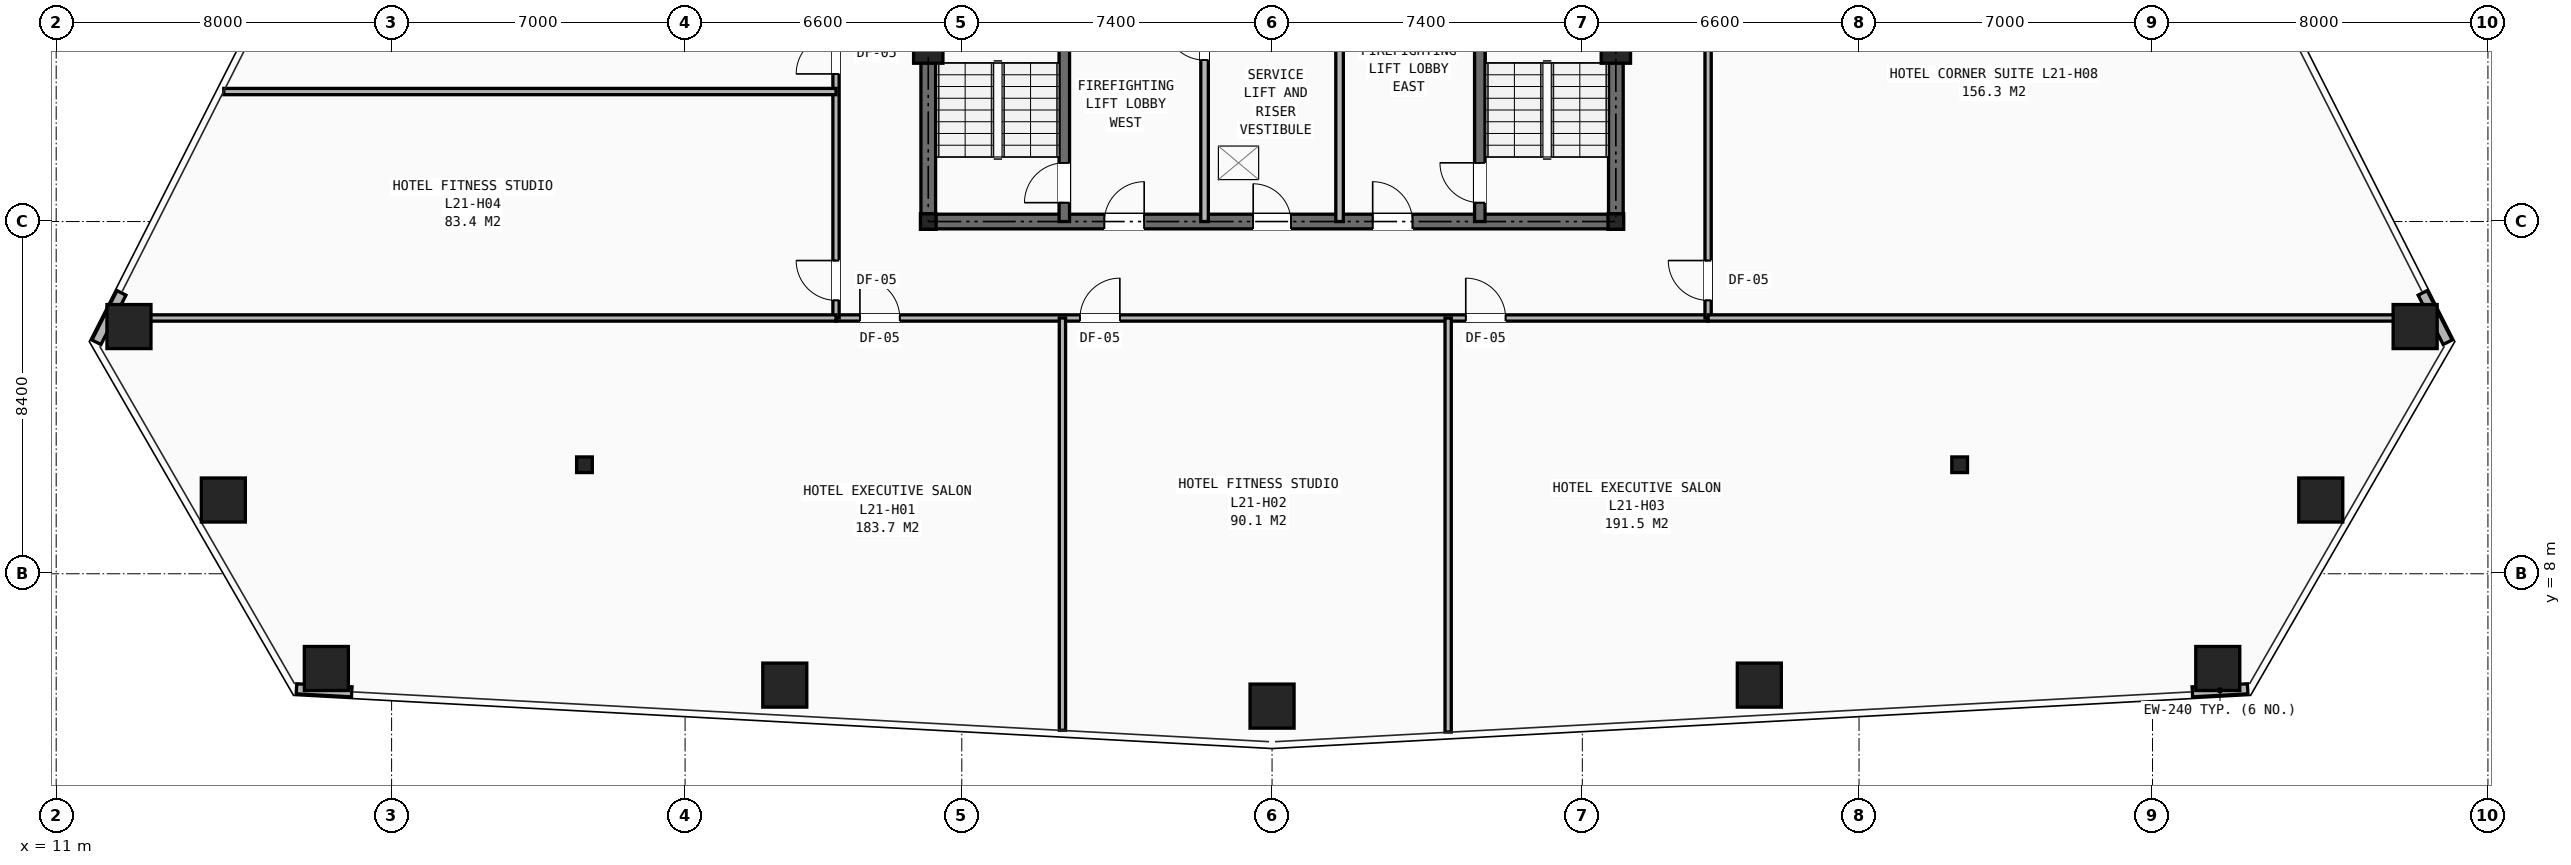
"""IFC4 building model, lengths in metres.
Left out: names, types, materials, properties, quantities, classifications, styles, units other than length and angle.
Written with IfcOpenShell. Run it as: python <this file> out.ifc"""

import sys

from ifc_helpers import new_model, si_unit, direction, frame, frame_2d, origin, origin_2d, place, context, subcontext, project, spatial, rectangle, hollow_rectangle, i_section, extrude, element, fill, save


model = new_model("IFC4")
c1 = context("Model", 3, precision=1e-05, world=origin(), true_north=direction((0.0, 1.0)))
c2 = subcontext(c1, "Body", "Model", "MODEL_VIEW")
j1 = project(units=[si_unit("LENGTHUNIT", "METRE"), si_unit("PLANEANGLEUNIT", "RADIAN")], contexts=[c1])
p1 = place(None, origin())
s1 = spatial("IfcSite", under=j1, at=p1, CompositionType="ELEMENT")
p2 = place(p1, origin())
s2 = spatial("IfcBuilding", under=s1, at=p2, CompositionType="ELEMENT")
p3 = place(p2, frame((0.0, 0.0, 76.6)))
s3 = spatial("IfcBuildingStorey", under=s2, at=p3, CompositionType="ELEMENT", Elevation=76.6)
for number, where, z_axis, x_axis in (
    (1, (31.8, 16.4, 0.0), (0.0, 0.0, 1.0), (1.0, 0.0, 0.0)),
    (2, (48.2, 16.4, 0.0), (0.0, 0.0, 1.0), (1.0, 0.0, 0.0)),
    (3, (23.6, 10.6, 0.0), (0.0, 0.0, 1.0), (1.0, 0.0, 0.0)),
    (4, (56.4, 10.6, 0.0), (0.0, 0.0, 1.0), (1.0, 0.0, 0.0)),
):
    element("IfcColumn", number, at=place(p3, frame(where, z_axis=z_axis, x_axis=x_axis)), inside=s3, PredefinedType="COLUMN", context=c2, shape_type="SweptSolid", body=[
        extrude(i_section(OverallWidth=0.374, OverallDepth=0.372, WebThickness=0.016, FlangeThickness=0.026, at=origin_2d()), origin(), (0.0, 0.0, 1.0), 3.2),
    ])
for number, where, z_axis, x_axis in (
    (5, (31.8, 20.4, 0.0), (0.0, 0.0, 1.0), (1.0, 0.0, 0.0)),
    (6, (48.2, 20.4, 0.0), (0.0, 0.0, 1.0), (1.0, 0.0, 0.0)),
):
    element("IfcColumn", number, at=place(p3, frame(where, z_axis=z_axis, x_axis=x_axis)), inside=s3, PredefinedType="PILASTER", context=c2, shape_type="SweptSolid", body=[
        extrude(rectangle(XDim=0.7, YDim=0.45, at=origin_2d()), origin(), (0.0, 0.0, 1.0), 3.2),
    ])
for number, where, z_axis, x_axis in (
    (7, (12.736, 13.896, 0.0), (0.0, 0.0, 1.0), (1.0, 0.0, 0.0)),
    (8, (14.987, 9.759, 0.0), (0.0, 0.0, 1.0), (1.0, 0.0, 0.0)),
    (9, (17.444, 5.741, 0.0), (0.0, 0.0, 1.0), (1.0, 0.0, 0.0)),
    (10, (28.378, 5.344, 0.0), (0.0, 0.0, 1.0), (1.0, 0.0, 0.0)),
    (11, (40.0, 4.844, 0.0), (0.0, 0.0, 1.0), (1.0, 0.0, 0.0)),
    (12, (51.622, 5.344, 0.0), (0.0, 0.0, 1.0), (1.0, 0.0, 0.0)),
    (13, (62.556, 5.741, 0.0), (0.0, 0.0, 1.0), (1.0, 0.0, 0.0)),
    (14, (65.013, 9.759, 0.0), (0.0, 0.0, 1.0), (1.0, 0.0, 0.0)),
    (15, (67.264, 13.896, 0.0), (0.0, 0.0, 1.0), (1.0, 0.0, 0.0)),
):
    element("IfcColumn", number, at=place(p3, frame(where, z_axis=z_axis, x_axis=x_axis)), inside=s3, PredefinedType="COLUMN", context=c2, shape_type="SweptSolid", body=[
        extrude(hollow_rectangle(XDim=1.05, YDim=1.05, WallThickness=0.07, at=origin_2d()), origin(), (0.0, 0.0, 1.0), 3.2),
    ])
p4 = place(p3, frame((12.557, 14.698, 0.0), z_axis=(0.0, 0.0, 1.0), x_axis=(-0.452239623624, -0.891896475396, 0.0)))
e16 = element("IfcWall", 16, at=p4, inside=s3, PredefinedType="SHEAR", context=c2, shape_type="SweptSolid", body=[
    extrude(rectangle(XDim=1.319, YDim=0.24, at=frame_2d((0.66, 0.0))), origin(), (0.0, 0.0, 1.0), 2.253),
])
for number, where, z_axis, x_axis in (
    (17, (16.731, 5.256, 0.0), (0.0, 0.0, 1.0), (0.999, -0.054, 0.0)),
    (18, (61.95, 5.185, 0.0), (0.0, 0.0, 1.0), (0.999, 0.054, 0.0)),
):
    element("IfcWall", number, at=place(p3, frame(where, z_axis=z_axis, x_axis=x_axis)), inside=s3, PredefinedType="SHEAR", context=c2, shape_type="SweptSolid", body=[
        extrude(rectangle(XDim=1.321, YDim=0.24, at=frame_2d((0.66, 0.0))), origin(), (0.0, 0.0, 1.0), 2.253),
    ])
p5 = place(p3, frame((68.04, 13.521, 0.0), z_axis=(0.0, 0.0, 1.0), x_axis=(-0.452239623624, 0.891896475396, 0.0)))
e19 = element("IfcWall", 19, at=p5, inside=s3, PredefinedType="SHEAR", context=c2, shape_type="SweptSolid", body=[
    extrude(rectangle(XDim=1.319, YDim=0.24, at=frame_2d((0.66, 0.0))), origin(), (0.0, 0.0, 1.0), 2.253),
])
p6 = place(p3, frame((31.8, 16.4, 0.0), z_axis=(0.0, 0.0, 1.0), x_axis=(1.0, 0.0, 0.0)))
e20 = element("IfcWall", 20, at=p6, inside=s3, PredefinedType="SHEAR", context=c2, shape_type="SweptSolid", body=[
    extrude(rectangle(XDim=16.4, YDim=0.35, at=frame_2d((8.2, 0.0))), origin(), (0.0, 0.0, 1.0), 2.97),
])
p7 = place(p6, frame((7.75, 0.0, 0.0)))
e21 = element("IfcOpeningElement", 21, at=p7, cuts=e20, PredefinedType="OPENING", context=c2, shape_type="SweptSolid", body=[
    extrude(rectangle(XDim=0.9, YDim=2.1, at=frame_2d((0.45, 1.05))), frame((0.0, 0.185, 0.0), z_axis=(0.0, -1.0, 0.0), x_axis=(1.0, 0.0, 0.0)), (0.0, 0.0, 1.0), 0.37),
])
p8 = place(p6, frame((4.2, 0.0, 0.0)))
e22 = element("IfcOpeningElement", 22, at=p8, cuts=e20, PredefinedType="OPENING", context=c2, shape_type="SweptSolid", body=[
    extrude(rectangle(XDim=0.95, YDim=2.1, at=frame_2d((0.475, 1.05))), frame((0.0, 0.185, 0.0), z_axis=(0.0, -1.0, 0.0), x_axis=(1.0, 0.0, 0.0)), (0.0, 0.0, 1.0), 0.37),
])
p9 = place(p6, frame((10.6, 0.0, 0.0)))
e23 = element("IfcOpeningElement", 23, at=p9, cuts=e20, PredefinedType="OPENING", context=c2, shape_type="SweptSolid", body=[
    extrude(rectangle(XDim=0.95, YDim=2.1, at=frame_2d((0.475, 1.05))), frame((0.0, 0.185, 0.0), z_axis=(0.0, -1.0, 0.0), x_axis=(1.0, 0.0, 0.0)), (0.0, 0.0, 1.0), 0.37),
])
p10 = place(p3, frame((31.8, 16.4, 0.0), z_axis=(0.0, 0.0, 1.0), x_axis=(0.0, 1.0, 0.0)))
e24 = element("IfcWall", 24, at=p10, inside=s3, PredefinedType="SHEAR", context=c2, shape_type="SweptSolid", body=[
    extrude(rectangle(XDim=14.8, YDim=0.35, at=frame_2d((7.4, 0.0))), origin(), (0.0, 0.0, 1.0), 2.97),
])
p11 = place(p10, frame((11.0, 0.0, 0.0)))
e25 = element("IfcOpeningElement", 25, at=p11, cuts=e24, PredefinedType="OPENING", context=c2, shape_type="SweptSolid", body=[
    extrude(rectangle(XDim=1.1, YDim=2.15, at=frame_2d((0.55, 1.075))), frame((0.0, 0.185, 0.0), z_axis=(0.0, -1.0, 0.0), x_axis=(1.0, 0.0, 0.0)), (0.0, 0.0, 1.0), 0.37),
])
p12 = place(p3, frame((48.2, 16.4, 0.0), z_axis=(0.0, 0.0, 1.0), x_axis=(0.0, 1.0, 0.0)))
e26 = element("IfcWall", 26, at=p12, inside=s3, PredefinedType="SHEAR", context=c2, shape_type="SweptSolid", body=[
    extrude(rectangle(XDim=14.8, YDim=0.35, at=frame_2d((7.4, 0.0))), origin(), (0.0, 0.0, 1.0), 2.97),
])
p13 = place(p12, frame((11.0, 0.0, 0.0)))
e27 = element("IfcOpeningElement", 27, at=p13, cuts=e26, PredefinedType="OPENING", context=c2, shape_type="SweptSolid", body=[
    extrude(rectangle(XDim=1.1, YDim=2.15, at=frame_2d((0.55, 1.075))), frame((0.0, 0.185, 0.0), z_axis=(0.0, -1.0, 0.0), x_axis=(1.0, 0.0, 0.0)), (0.0, 0.0, 1.0), 0.37),
])
p14 = place(p3, frame((35.045, 16.4, 0.0), z_axis=(0.0, 0.0, 1.0), x_axis=(0.0, 1.0, 0.0)))
e28 = element("IfcWall", 28, at=p14, inside=s3, PredefinedType="SHEAR", context=c2, shape_type="SweptSolid", body=[
    extrude(rectangle(XDim=8.4, YDim=0.25, at=frame_2d((4.2, 0.0))), origin(), (0.0, 0.0, 1.0), 2.97),
])
p15 = place(p14, frame((0.45, 0.0, 0.0)))
e29 = element("IfcOpeningElement", 29, at=p15, cuts=e28, PredefinedType="OPENING", context=c2, shape_type="SweptSolid", body=[
    extrude(rectangle(XDim=0.95, YDim=2.1, at=frame_2d((0.475, 1.05))), frame((0.0, 0.135, 0.0), z_axis=(0.0, -1.0, 0.0), x_axis=(1.0, 0.0, 0.0)), (0.0, 0.0, 1.0), 0.27),
])
p16 = place(p3, frame((44.955, 16.4, 0.0), z_axis=(0.0, 0.0, 1.0), x_axis=(0.0, 1.0, 0.0)))
e30 = element("IfcWall", 30, at=p16, inside=s3, PredefinedType="SHEAR", context=c2, shape_type="SweptSolid", body=[
    extrude(rectangle(XDim=8.4, YDim=0.25, at=frame_2d((4.2, 0.0))), origin(), (0.0, 0.0, 1.0), 2.97),
])
p17 = place(p16, frame((0.45, 0.0, 0.0)))
e31 = element("IfcOpeningElement", 31, at=p17, cuts=e30, PredefinedType="OPENING", context=c2, shape_type="SweptSolid", body=[
    extrude(rectangle(XDim=0.95, YDim=2.1, at=frame_2d((0.475, 1.05))), frame((0.0, 0.135, 0.0), z_axis=(0.0, -1.0, 0.0), x_axis=(1.0, 0.0, 0.0)), (0.0, 0.0, 1.0), 0.27),
])
p18 = place(p3, frame((38.39, 16.4, 0.0), z_axis=(0.0, 0.0, 1.0), x_axis=(0.0, 1.0, 0.0)))
e32 = element("IfcWall", 32, at=p18, inside=s3, PredefinedType="PARTITIONING", context=c2, shape_type="SweptSolid", body=[
    extrude(rectangle(XDim=8.4, YDim=0.18, at=frame_2d((4.2, 0.0))), origin(), (0.0, 0.0, 1.0), 2.421),
])
p19 = place(p18, frame((3.85, 0.0, 0.0)))
e33 = element("IfcOpeningElement", 33, at=p19, cuts=e32, PredefinedType="OPENING", context=c2, shape_type="SweptSolid", body=[
    extrude(rectangle(XDim=0.95, YDim=2.1, at=frame_2d((0.475, 1.05))), frame((0.0, 0.1, 0.0), z_axis=(0.0, -1.0, 0.0), x_axis=(1.0, 0.0, 0.0)), (0.0, 0.0, 1.0), 0.2),
])
p20 = place(p3, frame((41.61, 16.4, 0.0), z_axis=(0.0, 0.0, 1.0), x_axis=(0.0, 1.0, 0.0)))
e34 = element("IfcWall", 34, at=p20, inside=s3, PredefinedType="PARTITIONING", context=c2, shape_type="SweptSolid", body=[
    extrude(rectangle(XDim=8.4, YDim=0.18, at=frame_2d((4.2, 0.0))), origin(), (0.0, 0.0, 1.0), 2.421),
])
p21 = place(p3, frame((29.6, 14.1, 0.0), z_axis=(0.0, 0.0, 1.0), x_axis=(1.0, 0.0, 0.0)))
e35 = element("IfcWall", 35, at=p21, inside=s3, PredefinedType="PARTITIONING", context=c2, shape_type="SweptSolid", body=[
    extrude(rectangle(XDim=20.8, YDim=0.15, at=frame_2d((10.4, 0.0))), origin(), (0.0, 0.0, 1.0), 2.421),
])
p22 = place(p21, frame((0.57, 0.0, 0.0)))
e36 = element("IfcOpeningElement", 36, at=p22, cuts=e35, PredefinedType="OPENING", context=c2, shape_type="SweptSolid", body=[
    extrude(rectangle(XDim=0.95, YDim=2.1, at=frame_2d((0.475, 1.05))), frame((0.0, 0.085, 0.0), z_axis=(0.0, -1.0, 0.0), x_axis=(1.0, 0.0, 0.0)), (0.0, 0.0, 1.0), 0.17),
])
p23 = place(p21, frame((5.82, 0.0, 0.0)))
e37 = element("IfcOpeningElement", 37, at=p23, cuts=e35, PredefinedType="OPENING", context=c2, shape_type="SweptSolid", body=[
    extrude(rectangle(XDim=0.95, YDim=2.1, at=frame_2d((0.475, 1.05))), frame((0.0, 0.085, 0.0), z_axis=(0.0, -1.0, 0.0), x_axis=(1.0, 0.0, 0.0)), (0.0, 0.0, 1.0), 0.17),
])
p24 = place(p21, frame((15.02, 0.0, 0.0)))
e38 = element("IfcOpeningElement", 38, at=p24, cuts=e35, PredefinedType="OPENING", context=c2, shape_type="SweptSolid", body=[
    extrude(rectangle(XDim=0.95, YDim=2.1, at=frame_2d((0.475, 1.05))), frame((0.0, 0.085, 0.0), z_axis=(0.0, -1.0, 0.0), x_axis=(1.0, 0.0, 0.0)), (0.0, 0.0, 1.0), 0.17),
])
p25 = place(p3, frame((29.6, 14.1, 0.0), z_axis=(0.0, 0.0, 1.0), x_axis=(0.0, 1.0, 0.0)))
e39 = element("IfcWall", 39, at=p25, inside=s3, PredefinedType="PARTITIONING", context=c2, shape_type="SweptSolid", body=[
    extrude(rectangle(XDim=21.9, YDim=0.15, at=frame_2d((10.95, 0.0))), origin(), (0.0, 0.0, 1.0), 2.421),
])
p26 = place(p25, frame((0.42, 0.0, 0.0)))
e40 = element("IfcOpeningElement", 40, at=p26, cuts=e39, PredefinedType="OPENING", context=c2, shape_type="SweptSolid", body=[
    extrude(rectangle(XDim=0.95, YDim=2.1, at=frame_2d((0.475, 1.05))), frame((0.0, 0.085, 0.0), z_axis=(0.0, -1.0, 0.0), x_axis=(1.0, 0.0, 0.0)), (0.0, 0.0, 1.0), 0.17),
])
p27 = place(p25, frame((5.82, 0.0, 0.0)))
e41 = element("IfcOpeningElement", 41, at=p27, cuts=e39, PredefinedType="OPENING", context=c2, shape_type="SweptSolid", body=[
    extrude(rectangle(XDim=0.95, YDim=2.1, at=frame_2d((0.475, 1.05))), frame((0.0, 0.085, 0.0), z_axis=(0.0, -1.0, 0.0), x_axis=(1.0, 0.0, 0.0)), (0.0, 0.0, 1.0), 0.17),
])
p28 = place(p25, frame((11.32, 0.0, 0.0)))
e42 = element("IfcOpeningElement", 42, at=p28, cuts=e39, PredefinedType="OPENING", context=c2, shape_type="SweptSolid", body=[
    extrude(rectangle(XDim=0.95, YDim=2.1, at=frame_2d((0.475, 1.05))), frame((0.0, 0.085, 0.0), z_axis=(0.0, -1.0, 0.0), x_axis=(1.0, 0.0, 0.0)), (0.0, 0.0, 1.0), 0.17),
])
p29 = place(p25, frame((16.82, 0.0, 0.0)))
e43 = element("IfcOpeningElement", 43, at=p29, cuts=e39, PredefinedType="OPENING", context=c2, shape_type="SweptSolid", body=[
    extrude(rectangle(XDim=0.95, YDim=2.1, at=frame_2d((0.475, 1.05))), frame((0.0, 0.085, 0.0), z_axis=(0.0, -1.0, 0.0), x_axis=(1.0, 0.0, 0.0)), (0.0, 0.0, 1.0), 0.17),
])
p30 = place(p3, frame((50.4, 14.1, 0.0), z_axis=(0.0, 0.0, 1.0), x_axis=(0.0, 1.0, 0.0)))
e44 = element("IfcWall", 44, at=p30, inside=s3, PredefinedType="PARTITIONING", context=c2, shape_type="SweptSolid", body=[
    extrude(rectangle(XDim=21.9, YDim=0.15, at=frame_2d((10.95, 0.0))), origin(), (0.0, 0.0, 1.0), 2.421),
])
p31 = place(p30, frame((0.42, 0.0, 0.0)))
e45 = element("IfcOpeningElement", 45, at=p31, cuts=e44, PredefinedType="OPENING", context=c2, shape_type="SweptSolid", body=[
    extrude(rectangle(XDim=0.95, YDim=2.1, at=frame_2d((0.475, 1.05))), frame((0.0, 0.085, 0.0), z_axis=(0.0, -1.0, 0.0), x_axis=(1.0, 0.0, 0.0)), (0.0, 0.0, 1.0), 0.17),
])
p32 = place(p30, frame((11.82, 0.0, 0.0)))
e46 = element("IfcOpeningElement", 46, at=p32, cuts=e44, PredefinedType="OPENING", context=c2, shape_type="SweptSolid", body=[
    extrude(rectangle(XDim=0.95, YDim=2.1, at=frame_2d((0.475, 1.05))), frame((0.0, 0.085, 0.0), z_axis=(0.0, -1.0, 0.0), x_axis=(1.0, 0.0, 0.0)), (0.0, 0.0, 1.0), 0.17),
])
p33 = place(p3, frame((35.0, 4.269, 0.0), z_axis=(0.0, 0.0, 1.0), x_axis=(0.0, 1.0, 0.0)))
e47 = element("IfcWall", 47, at=p33, inside=s3, PredefinedType="PARTITIONING", context=c2, shape_type="SweptSolid", body=[
    extrude(rectangle(XDim=9.831, YDim=0.15, at=frame_2d((4.916, 0.0))), origin(), (0.0, 0.0, 1.0), 2.258),
])
p34 = place(p3, frame((44.2, 4.225, 0.0), z_axis=(0.0, 0.0, 1.0), x_axis=(0.0, 1.0, 0.0)))
e48 = element("IfcWall", 48, at=p34, inside=s3, PredefinedType="PARTITIONING", context=c2, shape_type="SweptSolid", body=[
    extrude(rectangle(XDim=9.875, YDim=0.15, at=frame_2d((4.938, 0.0))), origin(), (0.0, 0.0, 1.0), 2.258),
])
p35 = place(p3, frame((12.26, 14.1, 0.0), z_axis=(0.0, 0.0, 1.0), x_axis=(1.0, 0.0, 0.0)))
e49 = element("IfcWall", 49, at=p35, inside=s3, PredefinedType="PARTITIONING", context=c2, shape_type="SweptSolid", body=[
    extrude(rectangle(XDim=17.341, YDim=0.15, at=frame_2d((8.67, 0.0))), origin(), (0.0, 0.0, 1.0), 2.258),
])
p36 = place(p3, frame((14.998, 19.5, 0.0), z_axis=(0.0, 0.0, 1.0), x_axis=(1.0, 0.0, 0.0)))
e50 = element("IfcWall", 50, at=p36, inside=s3, PredefinedType="PARTITIONING", context=c2, shape_type="SweptSolid", body=[
    extrude(rectangle(XDim=14.602, YDim=0.15, at=frame_2d((7.301, 0.0))), origin(), (0.0, 0.0, 1.0), 2.258),
])
p37 = place(p3, frame((50.4, 14.1, 0.0), z_axis=(0.0, 0.0, 1.0), x_axis=(1.0, 0.0, 0.0)))
e51 = element("IfcWall", 51, at=p37, inside=s3, PredefinedType="PARTITIONING", context=c2, shape_type="SweptSolid", body=[
    extrude(rectangle(XDim=17.341, YDim=0.15, at=frame_2d((8.67, 0.0))), origin(), (0.0, 0.0, 1.0), 2.258),
])
p38 = place(p7, origin())
e52 = element("IfcDoor", 52, at=p38, inside=s3, OperationType="SINGLE_SWING_LEFT", PredefinedType="DOOR", context=c2, shape_type="SweptSolid", body=[
    extrude(rectangle(XDim=0.9, YDim=2.1, at=frame_2d((0.45, 1.05))), frame((0.0, 0.025, 0.0), z_axis=(0.0, -1.0, 0.0), x_axis=(1.0, 0.0, 0.0)), (0.0, 0.0, 1.0), 0.05),
])
fill(e21, e52)
p39 = place(p19, origin())
e53 = element("IfcDoor", 53, at=p39, inside=s3, OperationType="SINGLE_SWING_RIGHT", PredefinedType="DOOR", context=c2, shape_type="SweptSolid", body=[
    extrude(rectangle(XDim=0.95, YDim=2.1, at=frame_2d((0.475, 1.05))), frame((0.0, 0.025, 0.0), z_axis=(0.0, -1.0, 0.0), x_axis=(1.0, 0.0, 0.0)), (0.0, 0.0, 1.0), 0.05),
])
fill(e33, e53)
p40 = place(p15, origin())
e54 = element("IfcDoor", 54, at=p40, inside=s3, OperationType="SINGLE_SWING_LEFT", PredefinedType="DOOR", context=c2, shape_type="SweptSolid", body=[
    extrude(rectangle(XDim=0.95, YDim=2.1, at=frame_2d((0.475, 1.05))), frame((0.0, 0.025, 0.0), z_axis=(0.0, -1.0, 0.0), x_axis=(1.0, 0.0, 0.0)), (0.0, 0.0, 1.0), 0.05),
])
fill(e29, e54)
p41 = place(p17, origin())
e55 = element("IfcDoor", 55, at=p41, inside=s3, OperationType="SINGLE_SWING_RIGHT", PredefinedType="DOOR", context=c2, shape_type="SweptSolid", body=[
    extrude(rectangle(XDim=0.95, YDim=2.1, at=frame_2d((0.475, 1.05))), frame((0.0, 0.025, 0.0), z_axis=(0.0, -1.0, 0.0), x_axis=(1.0, 0.0, 0.0)), (0.0, 0.0, 1.0), 0.05),
])
fill(e31, e55)
p42 = place(p8, origin())
e56 = element("IfcDoor", 56, at=p42, inside=s3, OperationType="SINGLE_SWING_RIGHT", PredefinedType="DOOR", context=c2, shape_type="SweptSolid", body=[
    extrude(rectangle(XDim=0.95, YDim=2.1, at=frame_2d((0.475, 1.05))), frame((0.0, 0.025, 0.0), z_axis=(0.0, -1.0, 0.0), x_axis=(1.0, 0.0, 0.0)), (0.0, 0.0, 1.0), 0.05),
])
fill(e22, e56)
p43 = place(p9, origin())
e57 = element("IfcDoor", 57, at=p43, inside=s3, OperationType="SINGLE_SWING_LEFT", PredefinedType="DOOR", context=c2, shape_type="SweptSolid", body=[
    extrude(rectangle(XDim=0.95, YDim=2.1, at=frame_2d((0.475, 1.05))), frame((0.0, 0.025, 0.0), z_axis=(0.0, -1.0, 0.0), x_axis=(1.0, 0.0, 0.0)), (0.0, 0.0, 1.0), 0.05),
])
fill(e23, e57)
p44 = place(p22, origin())
e58 = element("IfcDoor", 58, at=p44, inside=s3, OperationType="SINGLE_SWING_LEFT", PredefinedType="DOOR", context=c2, shape_type="SweptSolid", body=[
    extrude(rectangle(XDim=0.95, YDim=2.1, at=frame_2d((0.475, 1.05))), frame((0.0, 0.025, 0.0), z_axis=(0.0, -1.0, 0.0), x_axis=(1.0, 0.0, 0.0)), (0.0, 0.0, 1.0), 0.05),
])
fill(e36, e58)
p45 = place(p23, origin())
e59 = element("IfcDoor", 59, at=p45, inside=s3, OperationType="SINGLE_SWING_RIGHT", PredefinedType="DOOR", context=c2, shape_type="SweptSolid", body=[
    extrude(rectangle(XDim=0.95, YDim=2.1, at=frame_2d((0.475, 1.05))), frame((0.0, 0.025, 0.0), z_axis=(0.0, -1.0, 0.0), x_axis=(1.0, 0.0, 0.0)), (0.0, 0.0, 1.0), 0.05),
])
fill(e37, e59)
p46 = place(p24, origin())
e60 = element("IfcDoor", 60, at=p46, inside=s3, OperationType="SINGLE_SWING_LEFT", PredefinedType="DOOR", context=c2, shape_type="SweptSolid", body=[
    extrude(rectangle(XDim=0.95, YDim=2.1, at=frame_2d((0.475, 1.05))), frame((0.0, 0.025, 0.0), z_axis=(0.0, -1.0, 0.0), x_axis=(1.0, 0.0, 0.0)), (0.0, 0.0, 1.0), 0.05),
])
fill(e38, e60)
p47 = place(p26, origin())
e61 = element("IfcDoor", 61, at=p47, inside=s3, OperationType="SINGLE_SWING_RIGHT", PredefinedType="DOOR", context=c2, shape_type="SweptSolid", body=[
    extrude(rectangle(XDim=0.95, YDim=2.1, at=frame_2d((0.475, 1.05))), frame((0.0, 0.025, 0.0), z_axis=(0.0, -1.0, 0.0), x_axis=(1.0, 0.0, 0.0)), (0.0, 0.0, 1.0), 0.05),
])
fill(e40, e61)
p48 = place(p27, origin())
e62 = element("IfcDoor", 62, at=p48, inside=s3, OperationType="SINGLE_SWING_LEFT", PredefinedType="DOOR", context=c2, shape_type="SweptSolid", body=[
    extrude(rectangle(XDim=0.95, YDim=2.1, at=frame_2d((0.475, 1.05))), frame((0.0, 0.025, 0.0), z_axis=(0.0, -1.0, 0.0), x_axis=(1.0, 0.0, 0.0)), (0.0, 0.0, 1.0), 0.05),
])
fill(e41, e62)
p49 = place(p31, origin())
e63 = element("IfcDoor", 63, at=p49, inside=s3, OperationType="SINGLE_SWING_RIGHT", PredefinedType="DOOR", context=c2, shape_type="SweptSolid", body=[
    extrude(rectangle(XDim=0.95, YDim=2.1, at=frame_2d((0.475, 1.05))), frame((0.0, 0.025, 0.0), z_axis=(0.0, -1.0, 0.0), x_axis=(1.0, 0.0, 0.0)), (0.0, 0.0, 1.0), 0.05),
])
fill(e45, e63)
save(model, sys.argv[1])
